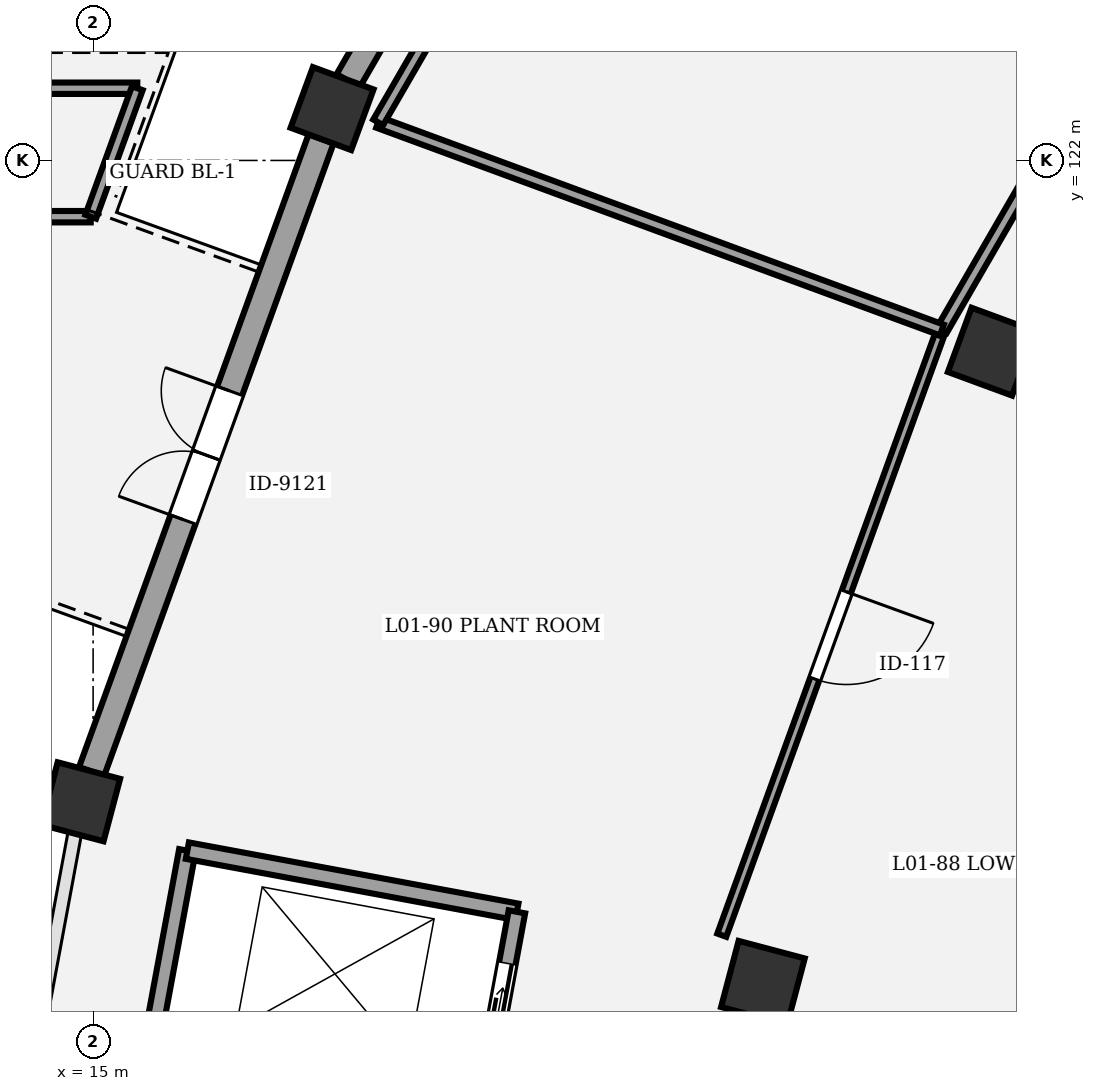
"""IFC4 building model, lengths in metres.
Left out: names, types, materials, properties, quantities, classifications, styles, units other than length and angle.
Written with IfcOpenShell. Run it as: python <this file> out.ifc"""

import sys

from ifc_helpers import new_model, si_unit, direction, frame, frame_2d, origin, origin_2d, place, context, subcontext, project, spatial, rectangle, extrude, element, fill, save


model = new_model("IFC4")
c1 = context("Model", 3, precision=1e-05, world=origin(), true_north=direction((0.0, 1.0)))
c2 = subcontext(c1, "Body", "Model", "MODEL_VIEW")
j1 = project(units=[si_unit("LENGTHUNIT", "METRE"), si_unit("PLANEANGLEUNIT", "RADIAN")], contexts=[c1])
p1 = place(None, origin())
s1 = spatial("IfcSite", under=j1, at=p1, CompositionType="ELEMENT")
p2 = place(p1, origin())
s2 = spatial("IfcBuilding", under=s1, at=p2, CompositionType="ELEMENT")
p3 = place(p2, frame((0.0, 0.0, 5.4)))
s3 = spatial("IfcBuildingStorey", under=s2, at=p3, CompositionType="ELEMENT", Elevation=5.4)
p4 = place(p3, frame((26.824, 119.484, 0.0), z_axis=(0.0, 0.0, 1.0), x_axis=(-0.938372433776, 0.34562577382, 0.0)))
e1 = element("IfcColumn", 1, at=p4, inside=s3, PredefinedType="COLUMN", context=c2, shape_type="SweptSolid", body=[
    extrude(rectangle(XDim=0.9, YDim=0.9, at=origin_2d()), origin(), (0.0, 0.0, 1.0), 4.8),
])
p5 = place(p3, frame((18.144, 122.682, 0.0), z_axis=(0.0, 0.0, 1.0), x_axis=(-0.938372433776, 0.34562577382, 0.0)))
e2 = element("IfcColumn", 2, at=p5, inside=s3, PredefinedType="COLUMN", context=c2, shape_type="SweptSolid", body=[
    extrude(rectangle(XDim=0.85, YDim=0.85, at=origin_2d()), origin(), (0.0, 0.0, 1.0), 4.8),
])
p6 = place(p3, frame((23.812, 111.182, 0.0), z_axis=(0.0, 0.0, 1.0), x_axis=(-0.966600102017, 0.256289373133, 0.0)))
e3 = element("IfcColumn", 3, at=p6, inside=s3, PredefinedType="COLUMN", context=c2, shape_type="SweptSolid", body=[
    extrude(rectangle(XDim=0.9, YDim=0.9, at=origin_2d()), origin(), (0.0, 0.0, 1.0), 4.8),
])
p7 = place(p3, frame((14.835, 113.562, 0.0), z_axis=(0.0, 0.0, 1.0), x_axis=(-0.966600102017, 0.256289373133, 0.0)))
e4 = element("IfcColumn", 4, at=p7, inside=s3, PredefinedType="COLUMN", context=c2, shape_type="SweptSolid", body=[
    extrude(rectangle(XDim=0.85, YDim=0.85, at=origin_2d()), origin(), (0.0, 0.0, 1.0), 4.8),
])
p8 = place(p3, frame((14.252, 113.717, 0.0), z_axis=(0.0, 0.0, 1.0), x_axis=(-0.256289373133, -0.966600102017, 0.0)))
e5 = element("IfcColumn", 5, at=p8, inside=s3, PredefinedType="PILASTER", context=c2, shape_type="SweptSolid", body=[
    extrude(rectangle(XDim=0.5, YDim=0.35, at=origin_2d()), origin(), (0.0, 0.0, 1.0), 4.8),
])
p9 = place(p3, frame((22.546, 130.295, 0.0), z_axis=(0.0, 0.0, 1.0), x_axis=(-0.500557937356, -0.865703038778, 0.0)))
e6 = element("IfcWall", 6, at=p9, inside=s3, PredefinedType="STANDARD", context=c2, shape_type="SweptSolid", body=[
    extrude(rectangle(XDim=8.371, YDim=0.35, at=frame_2d((4.186, 0.0))), origin(), (0.0, 0.0, 1.0), 3.57),
])
p10 = place(p9, frame((3.426, 0.0, 0.9)))
e7 = element("IfcOpeningElement", 7, at=p10, cuts=e6, PredefinedType="OPENING", context=c2, shape_type="SweptSolid", body=[
    extrude(rectangle(XDim=1.52, YDim=1.75, at=frame_2d((0.76, 0.875))), frame((0.0, 0.185, 0.0), z_axis=(0.0, -1.0, 0.0), x_axis=(1.0, 0.0, 0.0)), (0.0, 0.0, 1.0), 0.37),
])
p11 = place(p3, frame((14.98, 113.96, 0.0), z_axis=(0.0, 0.0, 1.0), x_axis=(0.341014666885, 0.940057975324, 0.0)))
e8 = element("IfcWall", 8, at=p11, inside=s3, PredefinedType="STANDARD", context=c2, shape_type="SweptSolid", body=[
    extrude(rectangle(XDim=8.855, YDim=0.35, at=frame_2d((4.428, 0.0))), origin(), (0.0, 0.0, 1.0), 3.57),
])
p12 = place(p11, frame((3.528, 0.0, 0.0)))
e9 = element("IfcOpeningElement", 9, at=p12, cuts=e8, PredefinedType="OPENING", context=c2, shape_type="SweptSolid", body=[
    extrude(rectangle(XDim=1.8, YDim=2.4, at=frame_2d((0.9, 1.2))), frame((0.0, 0.185, 0.0), z_axis=(0.0, -1.0, 0.0), x_axis=(1.0, 0.0, 0.0)), (0.0, 0.0, 1.0), 0.37),
])
p13 = place(p3, frame((14.228, 102.085, 0.0), z_axis=(0.0, 0.0, 1.0), x_axis=(0.182574755222, 0.983191974517, 0.0)))
e10 = element("IfcWall", 10, at=p13, inside=s3, PredefinedType="SHEAR", context=c2, shape_type="SweptSolid", body=[
    extrude(rectangle(XDim=11.02, YDim=0.22, at=frame_2d((5.51, 0.0))), origin(), (0.0, 0.0, 1.0), 4.55),
])
p14 = place(p3, frame((20.576, 112.115, 0.0), z_axis=(0.0, 0.0, 1.0), x_axis=(-0.983189729951, 0.18258684213, 0.0)))
e11 = element("IfcWall", 11, at=p14, inside=s3, PredefinedType="SHEAR", context=c2, shape_type="SweptSolid", body=[
    extrude(rectangle(XDim=4.41, YDim=0.22, at=frame_2d((2.205, 0.0))), origin(), (0.0, 0.0, 1.0), 4.55),
])
p15 = place(p3, frame((18.564, 101.28, 0.0), z_axis=(0.0, 0.0, 1.0), x_axis=(0.182570778451, 0.983192712979, 0.0)))
e12 = element("IfcWall", 12, at=p15, inside=s3, PredefinedType="SHEAR", context=c2, shape_type="SweptSolid", body=[
    extrude(rectangle(XDim=11.02, YDim=0.22, at=frame_2d((5.51, 0.0))), origin(), (0.0, 0.0, 1.0), 4.55),
])
p16 = place(p15, frame((0.3, 0.0, 0.0)))
e13 = element("IfcOpeningElement", 13, at=p16, cuts=e12, PredefinedType="OPENING", context=c2, shape_type="SweptSolid", body=[
    extrude(rectangle(XDim=1.15, YDim=2.15, at=frame_2d((0.575, 1.075))), frame((0.0, 0.12, 0.0), z_axis=(0.0, -1.0, 0.0), x_axis=(1.0, 0.0, 0.0)), (0.0, 0.0, 1.0), 0.24),
])
p17 = place(p15, frame((9.23, 0.0, 0.0)))
e14 = element("IfcOpeningElement", 14, at=p17, cuts=e12, PredefinedType="OPENING", context=c2, shape_type="SweptSolid", body=[
    extrude(rectangle(XDim=1.1, YDim=2.15, at=frame_2d((0.55, 1.075))), frame((0.0, 0.12, 0.0), z_axis=(0.0, -1.0, 0.0), x_axis=(1.0, 0.0, 0.0)), (0.0, 0.0, 1.0), 0.24),
])
p18 = place(p3, frame((30.359, 127.019, 0.0), z_axis=(0.0, 0.0, 1.0), x_axis=(-0.500559280672, -0.865702262059, 0.0)))
e15 = element("IfcWall", 15, at=p18, inside=s3, PredefinedType="PARTITIONING", context=c2, shape_type="SweptSolid", body=[
    extrude(rectangle(XDim=8.375, YDim=0.15, at=frame_2d((4.187, 0.0))), origin(), (0.0, 0.0, 1.0), 3.55),
])
p19 = place(p18, frame((3.617, 0.0, 0.0)))
e16 = element("IfcOpeningElement", 16, at=p19, cuts=e15, PredefinedType="OPENING", context=c2, shape_type="SweptSolid", body=[
    extrude(rectangle(XDim=1.14, YDim=2.1, at=frame_2d((0.57, 1.05))), frame((0.0, 0.085, 0.0), z_axis=(0.0, -1.0, 0.0), x_axis=(1.0, 0.0, 0.0)), (0.0, 0.0, 1.0), 0.17),
])
p20 = place(p3, frame((26.134, 119.696, 0.0), z_axis=(0.0, 0.0, 1.0), x_axis=(-0.341044550343, -0.940047134287, 0.0)))
e17 = element("IfcWall", 17, at=p20, inside=s3, PredefinedType="PARTITIONING", context=c2, shape_type="SweptSolid", body=[
    extrude(rectangle(XDim=8.392, YDim=0.125, at=frame_2d((4.196, 0.0))), origin(), (0.0, 0.0, 1.0), 3.55),
])
p21 = place(p20, frame((3.586, 0.0, 0.0)))
e18 = element("IfcOpeningElement", 18, at=p21, cuts=e17, PredefinedType="OPENING", context=c2, shape_type="SweptSolid", body=[
    extrude(rectangle(XDim=1.22, YDim=2.1, at=frame_2d((0.61, 1.05))), frame((0.0, 0.073, 0.0), z_axis=(0.0, -1.0, 0.0), x_axis=(1.0, 0.0, 0.0)), (0.0, 0.0, 1.0), 0.145),
])
p22 = place(p3, frame((14.969, 121.26, 0.0), z_axis=(0.0, 0.0, 1.0), x_axis=(-1.0, 0.0, 0.0)))
e19 = element("IfcWall", 19, at=p22, inside=s3, PredefinedType="PARTITIONING", context=c2, shape_type="SweptSolid", body=[
    extrude(rectangle(XDim=10.608, YDim=0.15, at=frame_2d((5.304, 0.0))), origin(), (0.0, 0.0, 1.0), 3.55),
])
p23 = place(p22, frame((2.086, 0.0, 0.0)))
e20 = element("IfcOpeningElement", 20, at=p23, cuts=e19, PredefinedType="OPENING", context=c2, shape_type="SweptSolid", body=[
    extrude(rectangle(XDim=1.14, YDim=2.1, at=frame_2d((0.57, 1.05))), frame((0.0, 0.085, 0.0), z_axis=(0.0, -1.0, 0.0), x_axis=(1.0, 0.0, 0.0)), (0.0, 0.0, 1.0), 0.17),
])
p24 = place(p3, frame((26.167, 119.769, 0.0), z_axis=(0.0, 0.0, 1.0), x_axis=(-0.938352081903, 0.34568102405, 0.0)))
e21 = element("IfcWall", 21, at=p24, inside=s3, PredefinedType="PARTITIONING", context=c2, shape_type="SweptSolid", body=[
    extrude(rectangle(XDim=7.904, YDim=0.15, at=frame_2d((3.952, 0.0))), origin(), (0.0, 0.0, 1.0), 3.55),
])
p25 = place(p3, frame((18.75, 122.501, 0.0), z_axis=(0.0, 0.0, 1.0), x_axis=(0.500574107164, 0.865693689036, 0.0)))
e22 = element("IfcWall", 22, at=p25, inside=s3, PredefinedType="PARTITIONING", context=c2, shape_type="SweptSolid", body=[
    extrude(rectangle(XDim=9.08, YDim=0.15, at=frame_2d((4.54, 0.0))), origin(), (0.0, 0.0, 1.0), 3.55),
])
p26 = place(p3, frame((4.36, 122.95, 0.0), z_axis=(0.0, 0.0, 1.0), x_axis=(1.0, 0.0, 0.0)))
e23 = element("IfcWall", 23, at=p26, inside=s3, PredefinedType="PARTITIONING", context=c2, shape_type="SweptSolid", body=[
    extrude(rectangle(XDim=11.221, YDim=0.15, at=frame_2d((5.611, 0.0))), origin(), (0.0, 0.0, 1.0), 3.55),
])
p27 = place(p3, frame((15.582, 122.95, 0.0), z_axis=(0.0, 0.0, 1.0), x_axis=(-0.341012375502, -0.940058806541, 0.0)))
e24 = element("IfcWall", 24, at=p27, inside=s3, PredefinedType="PARTITIONING", context=c2, shape_type="SweptSolid", body=[
    extrude(rectangle(XDim=1.798, YDim=0.15, at=frame_2d((0.899, 0.0))), origin(), (0.0, 0.0, 1.0), 3.55),
])
p28 = place(p12, origin())
e25 = element("IfcDoor", 25, at=p28, inside=s3, OperationType="DOUBLE_DOOR_SINGLE_SWING", PredefinedType="DOOR", context=c2, shape_type="SweptSolid", body=[
    extrude(rectangle(XDim=1.8, YDim=2.4, at=frame_2d((0.9, 1.2))), frame((0.0, 0.025, 0.0), z_axis=(0.0, -1.0, 0.0), x_axis=(1.0, 0.0, 0.0)), (0.0, 0.0, 1.0), 0.05),
])
fill(e9, e25)
p29 = place(p17, origin())
e26 = element("IfcDoor", 26, at=p29, inside=s3, OperationType="DOUBLE_DOOR_SLIDING", PredefinedType="DOOR", context=c2, shape_type="SweptSolid", body=[
    extrude(rectangle(XDim=1.1, YDim=2.15, at=frame_2d((0.55, 1.075))), frame((0.0, 0.025, 0.0), z_axis=(0.0, -1.0, 0.0), x_axis=(1.0, 0.0, 0.0)), (0.0, 0.0, 1.0), 0.05),
])
fill(e14, e26)
p30 = place(p21, origin())
e27 = element("IfcDoor", 27, at=p30, inside=s3, OperationType="SINGLE_SWING_LEFT", PredefinedType="DOOR", context=c2, shape_type="SweptSolid", body=[
    extrude(rectangle(XDim=1.22, YDim=2.1, at=frame_2d((0.61, 1.05))), frame((0.0, 0.025, 0.0), z_axis=(0.0, -1.0, 0.0), x_axis=(1.0, 0.0, 0.0)), (0.0, 0.0, 1.0), 0.05),
])
fill(e18, e27)
save(model, sys.argv[1])
